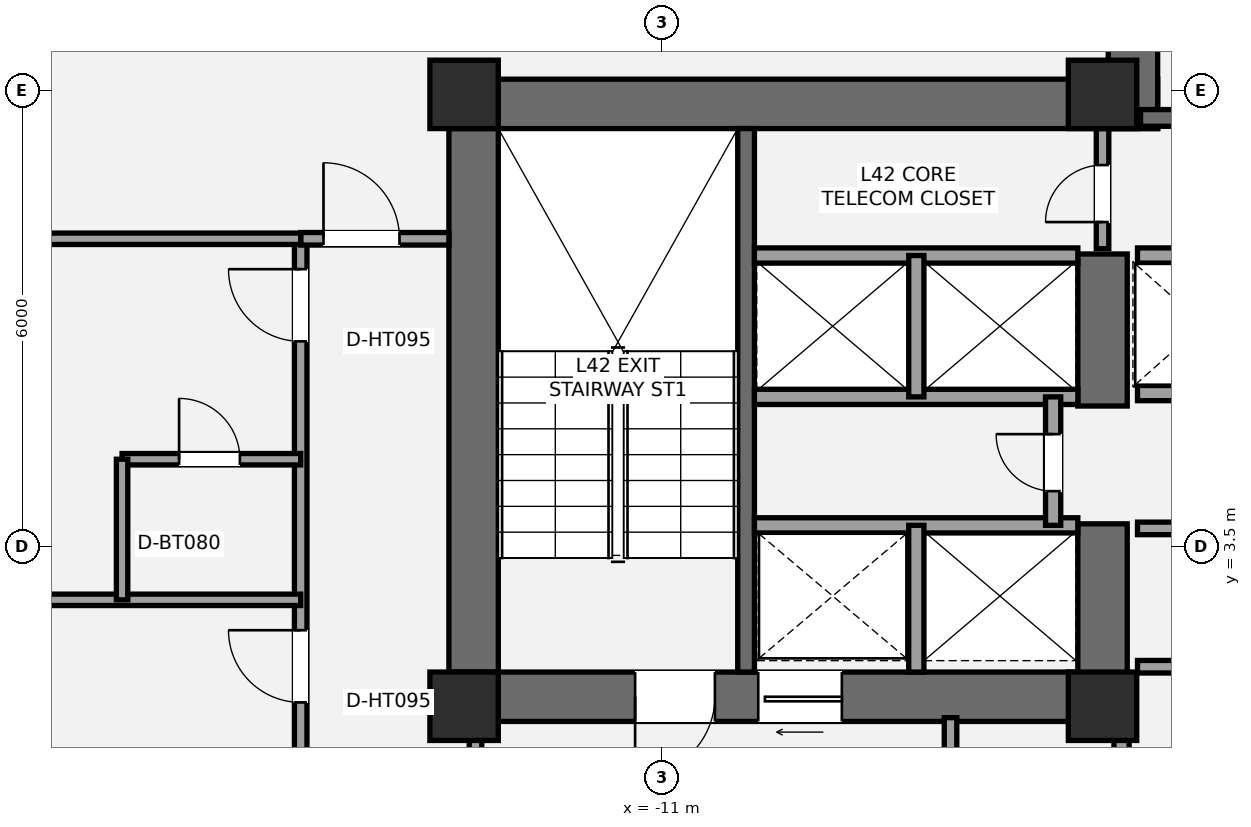
"""IFC4 building model, lengths in metres.
Left out: names, types, materials, properties, quantities, classifications, styles, units other than length and angle.
Written with IfcOpenShell. Run it as: python <this file> out.ifc"""

import sys

from ifc_helpers import new_model, si_unit, direction, frame, frame_2d, origin, origin_2d, place, context, subcontext, project, spatial, rectangle, extrude, element, fill, save


model = new_model("IFC4")
c1 = context("Model", 3, precision=1e-05, world=origin(), true_north=direction((0.0, 1.0)))
c2 = subcontext(c1, "Body", "Model", "MODEL_VIEW")
j1 = project(units=[si_unit("LENGTHUNIT", "METRE"), si_unit("PLANEANGLEUNIT", "RADIAN")], contexts=[c1])
p1 = place(None, origin())
s1 = spatial("IfcSite", under=j1, at=p1, CompositionType="ELEMENT")
p2 = place(p1, origin())
s2 = spatial("IfcBuilding", under=s1, at=p2, CompositionType="ELEMENT")
p3 = place(p2, frame((0.0, 0.0, 156.6)))
s3 = spatial("IfcBuildingStorey", under=s2, at=p3, CompositionType="ELEMENT", Elevation=156.6)
p4 = place(p3, frame((-13.475, 1.2, 0.0), z_axis=(0.0, 0.0, 1.0), x_axis=(0.0, 1.0, 0.0)))
e1 = element("IfcWall", 1, at=p4, inside=s3, PredefinedType="SHEAR", context=c2, shape_type="SweptSolid", body=[
    extrude(rectangle(XDim=8.45, YDim=0.65, at=frame_2d((4.225, 0.0))), origin(), (0.0, 0.0, 1.0), 3.2),
])
p5 = place(p3, frame((-13.8, 9.325, 0.0), z_axis=(0.0, 0.0, 1.0), x_axis=(1.0, 0.0, 0.0)))
e2 = element("IfcWall", 2, at=p5, inside=s3, PredefinedType="SHEAR", context=c2, shape_type="SweptSolid", body=[
    extrude(rectangle(XDim=9.325, YDim=0.65, at=frame_2d((4.663, 0.0))), origin(), (0.0, 0.0, 1.0), 3.2),
])
p6 = place(p3, frame((-4.875, 1.525, 0.0), z_axis=(0.0, 0.0, 1.0), x_axis=(-1.0, 0.0, 0.0)))
e3 = element("IfcWall", 3, at=p6, inside=s3, PredefinedType="SHEAR", context=c2, shape_type="SweptSolid", body=[
    extrude(rectangle(XDim=8.925, YDim=0.65, at=frame_2d((4.462, 0.0))), origin(), (0.0, 0.0, 1.0), 3.2),
])
p7 = place(p6, frame((5.425, 0.0, 0.0)))
e4 = element("IfcOpeningElement", 4, at=p7, cuts=e3, PredefinedType="OPENING", context=c2, shape_type="SweptSolid", body=[
    extrude(rectangle(XDim=1.05, YDim=2.15, at=frame_2d((0.525, 1.075))), frame((0.0, 0.335, 0.0), z_axis=(0.0, -1.0, 0.0), x_axis=(1.0, 0.0, 0.0)), (0.0, 0.0, 1.0), 0.67),
])
p8 = place(p6, frame((3.755, 0.0, 0.0)))
e5 = element("IfcOpeningElement", 5, at=p8, cuts=e3, PredefinedType="OPENING", context=c2, shape_type="SweptSolid", body=[
    extrude(rectangle(XDim=1.1, YDim=2.2, at=frame_2d((0.55, 1.1))), frame((0.0, 0.335, 0.0), z_axis=(0.0, -1.0, 0.0), x_axis=(1.0, 0.0, 0.0)), (0.0, 0.0, 1.0), 0.67),
])
p9 = place(p3, frame((-5.2, 1.2, 0.0), z_axis=(0.0, 0.0, 1.0), x_axis=(0.0, 1.0, 0.0)))
e6 = element("IfcWall", 6, at=p9, inside=s3, PredefinedType="SHEAR", context=c2, shape_type="SweptSolid", body=[
    extrude(rectangle(XDim=2.6, YDim=0.65, at=frame_2d((1.3, 0.0))), origin(), (0.0, 0.0, 1.0), 3.2),
])
p10 = place(p3, frame((-5.2, 5.35, 0.0), z_axis=(0.0, 0.0, 1.0), x_axis=(0.0, 1.0, 0.0)))
e7 = element("IfcWall", 7, at=p10, inside=s3, PredefinedType="SHEAR", context=c2, shape_type="SweptSolid", body=[
    extrude(rectangle(XDim=2.0, YDim=0.65, at=frame_2d((1.0, 0.0))), origin(), (0.0, 0.0, 1.0), 3.2),
])
p11 = place(p3, frame((-9.89, 1.85, 0.0), z_axis=(0.0, 0.0, 1.0), x_axis=(0.0, 1.0, 0.0)))
e8 = element("IfcWall", 8, at=p11, inside=s3, PredefinedType="SHEAR", context=c2, shape_type="SweptSolid", body=[
    extrude(rectangle(XDim=7.15, YDim=0.22, at=frame_2d((3.575, 0.0))), origin(), (0.0, 0.0, 1.0), 3.2),
])
p12 = place(p3, frame((-4.8, 9.0, 0.0), z_axis=(0.0, 0.0, 1.0), x_axis=(0.0, 1.0, 0.0)))
e9 = element("IfcWall", 9, at=p12, inside=s3, PredefinedType="SHEAR", context=c2, shape_type="SweptSolid", body=[
    extrude(rectangle(XDim=4.05, YDim=0.65, at=frame_2d((2.025, 0.0))), origin(), (0.0, 0.0, 1.0), 3.2),
])
p13 = place(p3, frame((-4.7, 9.14, 0.0), z_axis=(0.0, 0.0, 1.0), x_axis=(1.0, 0.0, 0.0)))
e10 = element("IfcWall", 10, at=p13, inside=s3, PredefinedType="SHEAR", context=c2, shape_type="SweptSolid", body=[
    extrude(rectangle(XDim=9.3, YDim=0.22, at=frame_2d((4.65, 0.0))), origin(), (0.0, 0.0, 1.0), 3.2),
])
p14 = place(p13, frame((1.15, 0.0, 0.0)))
e11 = element("IfcOpeningElement", 11, at=p14, cuts=e10, PredefinedType="OPENING", context=c2, shape_type="SweptSolid", body=[
    extrude(rectangle(XDim=1.05, YDim=2.15, at=frame_2d((0.525, 1.075))), frame((0.0, 0.12, 0.0), z_axis=(0.0, -1.0, 0.0), x_axis=(1.0, 0.0, 0.0)), (0.0, 0.0, 1.0), 0.24),
])
for number, where, z_axis, x_axis in (
    (12, (-13.6, 1.4, 0.0), (0.0, 0.0, 1.0), (1.0, 0.0, 0.0)),
    (13, (-13.6, 9.45, 0.0), (0.0, 0.0, 1.0), (1.0, 0.0, 0.0)),
    (14, (-5.2, 1.4, 0.0), (0.0, 0.0, 1.0), (1.0, 0.0, 0.0)),
    (15, (-5.2, 9.45, 0.0), (0.0, 0.0, 1.0), (1.0, 0.0, 0.0)),
):
    element("IfcColumn", number, at=place(p3, frame(where, z_axis=z_axis, x_axis=x_axis)), inside=s3, PredefinedType="COLUMN", context=c2, shape_type="SweptSolid", body=[
        extrude(rectangle(XDim=0.9, YDim=0.9, at=origin_2d()), origin(), (0.0, 0.0, 1.0), 3.2),
    ])
p15 = place(p3, frame((-13.45, -2.15, 0.0), z_axis=(0.0, 0.0, 1.0), x_axis=(0.0, 1.0, 0.0)))
e16 = element("IfcWall", 16, at=p15, inside=s3, PredefinedType="PARTITIONING", context=c2, shape_type="SweptSolid", body=[
    extrude(rectangle(XDim=3.4, YDim=0.165, at=frame_2d((1.7, 0.0))), origin(), (0.0, 0.0, 1.0), 2.473),
])
p16 = place(p15, frame((1.15, 0.0, 0.0)))
e17 = element("IfcOpeningElement", 17, at=p16, cuts=e16, PredefinedType="OPENING", context=c2, shape_type="SweptSolid", body=[
    extrude(rectangle(XDim=1.05, YDim=2.15, at=frame_2d((0.525, 1.075))), frame((0.0, 0.093, 0.0), z_axis=(0.0, -1.0, 0.0), x_axis=(1.0, 0.0, 0.0)), (0.0, 0.0, 1.0), 0.185),
])
p17 = place(p3, frame((-7.2, -2.15, 0.0), z_axis=(0.0, 0.0, 1.0), x_axis=(0.0, 1.0, 0.0)))
e18 = element("IfcWall", 18, at=p17, inside=s3, PredefinedType="PARTITIONING", context=c2, shape_type="SweptSolid", body=[
    extrude(rectangle(XDim=3.4, YDim=0.165, at=frame_2d((1.7, 0.0))), origin(), (0.0, 0.0, 1.0), 2.473),
])
p18 = place(p3, frame((-4.95, -2.15, 0.0), z_axis=(0.0, 0.0, 1.0), x_axis=(0.0, 1.0, 0.0)))
e19 = element("IfcWall", 19, at=p18, inside=s3, PredefinedType="SOLIDWALL", context=c2, shape_type="SweptSolid", body=[
    extrude(rectangle(XDim=3.4, YDim=0.2, at=frame_2d((1.7, 0.0))), origin(), (0.0, 0.0, 1.0), 2.473),
])
p19 = place(p18, frame((0.95, 0.0, 0.0)))
e20 = element("IfcOpeningElement", 20, at=p19, cuts=e19, PredefinedType="OPENING", context=c2, shape_type="SweptSolid", body=[
    extrude(rectangle(XDim=0.75, YDim=2.1, at=frame_2d((0.375, 1.05))), frame((0.0, 0.11, 0.0), z_axis=(0.0, -1.0, 0.0), x_axis=(1.0, 0.0, 0.0)), (0.0, 0.0, 1.0), 0.22),
])
p20 = place(p3, frame((-9.78, 3.78, 0.0), z_axis=(0.0, 0.0, 1.0), x_axis=(1.0, 0.0, 0.0)))
e21 = element("IfcWall", 21, at=p20, inside=s3, PredefinedType="SOLIDWALL", context=c2, shape_type="SweptSolid", body=[
    extrude(rectangle(XDim=4.255, YDim=0.2, at=frame_2d((2.127, 0.0))), origin(), (0.0, 0.0, 1.0), 3.02),
])
p21 = place(p3, frame((-7.65, 1.85, 0.0), z_axis=(0.0, 0.0, 1.0), x_axis=(0.0, 1.0, 0.0)))
e22 = element("IfcWall", 22, at=p21, inside=s3, PredefinedType="SOLIDWALL", context=c2, shape_type="SweptSolid", body=[
    extrude(rectangle(XDim=1.93, YDim=0.2, at=frame_2d((0.965, 0.0))), origin(), (0.0, 0.0, 1.0), 3.02),
])
for number, where, z_axis, x_axis in (
    (23, (-9.78, 5.47, 0.0), (0.0, 0.0, 1.0), (1.0, 0.0, 0.0)),
    (24, (-9.78, 7.33, 0.0), (0.0, 0.0, 1.0), (1.0, 0.0, 0.0)),
):
    element("IfcWall", number, at=place(p3, frame(where, z_axis=z_axis, x_axis=x_axis)), inside=s3, PredefinedType="SOLIDWALL", context=c2, shape_type="SweptSolid", body=[
        extrude(rectangle(XDim=4.255, YDim=0.2, at=frame_2d((2.127, 0.0))), origin(), (0.0, 0.0, 1.0), 3.02),
    ])
p22 = place(p3, frame((-7.65, 5.47, 0.0), z_axis=(0.0, 0.0, 1.0), x_axis=(0.0, 1.0, 0.0)))
e25 = element("IfcWall", 25, at=p22, inside=s3, PredefinedType="SOLIDWALL", context=c2, shape_type="SweptSolid", body=[
    extrude(rectangle(XDim=1.86, YDim=0.2, at=frame_2d((0.93, 0.0))), origin(), (0.0, 0.0, 1.0), 3.02),
])
p23 = place(p3, frame((-5.85, 3.78, 0.0), z_axis=(0.0, 0.0, 1.0), x_axis=(0.0, 1.0, 0.0)))
e26 = element("IfcWall", 26, at=p23, inside=s3, PredefinedType="SOLIDWALL", context=c2, shape_type="SweptSolid", body=[
    extrude(rectangle(XDim=1.69, YDim=0.2, at=frame_2d((0.845, 0.0))), origin(), (0.0, 0.0, 1.0), 3.02),
])
p24 = place(p23, frame((0.45, 0.0, 0.0)))
e27 = element("IfcOpeningElement", 27, at=p24, cuts=e26, PredefinedType="OPENING", context=c2, shape_type="SweptSolid", body=[
    extrude(rectangle(XDim=0.75, YDim=2.1, at=frame_2d((0.375, 1.05))), frame((0.0, 0.11, 0.0), z_axis=(0.0, -1.0, 0.0), x_axis=(1.0, 0.0, 0.0)), (0.0, 0.0, 1.0), 0.22),
])
p25 = place(p3, frame((-4.74, 1.92, 0.0), z_axis=(0.0, 0.0, 1.0), x_axis=(1.0, 0.0, 0.0)))
e28 = element("IfcWall", 28, at=p25, inside=s3, PredefinedType="PARTITIONING", context=c2, shape_type="SweptSolid", body=[
    extrude(rectangle(XDim=3.89, YDim=0.165, at=frame_2d((1.945, 0.0))), origin(), (0.0, 0.0, 1.0), 2.16),
])
p26 = place(p3, frame((-4.74, 3.74, 0.0), z_axis=(0.0, 0.0, 1.0), x_axis=(1.0, 0.0, 0.0)))
e29 = element("IfcWall", 29, at=p26, inside=s3, PredefinedType="PARTITIONING", context=c2, shape_type="SweptSolid", body=[
    extrude(rectangle(XDim=3.89, YDim=0.165, at=frame_2d((1.945, 0.0))), origin(), (0.0, 0.0, 1.0), 3.02),
])
p27 = place(p26, frame((1.6, 0.0, 0.0)))
e30 = element("IfcOpeningElement", 30, at=p27, cuts=e29, PredefinedType="OPENING", context=c2, shape_type="SweptSolid", body=[
    extrude(rectangle(XDim=0.85, YDim=2.1, at=frame_2d((0.425, 1.05))), frame((0.0, 0.093, 0.0), z_axis=(0.0, -1.0, 0.0), x_axis=(1.0, 0.0, 0.0)), (0.0, 0.0, 1.0), 0.185),
])
p28 = place(p3, frame((-4.74, 5.52, 0.0), z_axis=(0.0, 0.0, 1.0), x_axis=(1.0, 0.0, 0.0)))
e31 = element("IfcWall", 31, at=p28, inside=s3, PredefinedType="SOLIDWALL", context=c2, shape_type="SweptSolid", body=[
    extrude(rectangle(XDim=3.86, YDim=0.2, at=frame_2d((1.93, 0.0))), origin(), (0.0, 0.0, 1.0), 3.02),
])
p29 = place(p28, frame((0.55, 0.0, 0.0)))
e32 = element("IfcOpeningElement", 32, at=p29, cuts=e31, PredefinedType="OPENING", context=c2, shape_type="SweptSolid", body=[
    extrude(rectangle(XDim=1.1, YDim=2.2, at=frame_2d((0.55, 1.1))), frame((0.0, 0.11, 0.0), z_axis=(0.0, -1.0, 0.0), x_axis=(1.0, 0.0, 0.0)), (0.0, 0.0, 1.0), 0.22),
])
p30 = place(p28, frame((2.3, 0.0, 0.0)))
e33 = element("IfcOpeningElement", 33, at=p30, cuts=e31, PredefinedType="OPENING", context=c2, shape_type="SweptSolid", body=[
    extrude(rectangle(XDim=1.1, YDim=2.2, at=frame_2d((0.55, 1.1))), frame((0.0, 0.11, 0.0), z_axis=(0.0, -1.0, 0.0), x_axis=(1.0, 0.0, 0.0)), (0.0, 0.0, 1.0), 0.22),
])
p31 = place(p3, frame((-4.74, 7.33, 0.0), z_axis=(0.0, 0.0, 1.0), x_axis=(1.0, 0.0, 0.0)))
e34 = element("IfcWall", 34, at=p31, inside=s3, PredefinedType="SOLIDWALL", context=c2, shape_type="SweptSolid", body=[
    extrude(rectangle(XDim=3.86, YDim=0.2, at=frame_2d((1.93, 0.0))), origin(), (0.0, 0.0, 1.0), 3.02),
])
p32 = place(p3, frame((-5.2, 7.42, 0.0), z_axis=(0.0, 0.0, 1.0), x_axis=(0.0, 1.0, 0.0)))
e35 = element("IfcWall", 35, at=p32, inside=s3, PredefinedType="PARTITIONING", context=c2, shape_type="SweptSolid", body=[
    extrude(rectangle(XDim=1.58, YDim=0.165, at=frame_2d((0.79, 0.0))), origin(), (0.0, 0.0, 1.0), 3.02),
])
p33 = place(p32, frame((0.35, 0.0, 0.0)))
e36 = element("IfcOpeningElement", 36, at=p33, cuts=e35, PredefinedType="OPENING", context=c2, shape_type="SweptSolid", body=[
    extrude(rectangle(XDim=0.75, YDim=2.1, at=frame_2d((0.375, 1.05))), frame((0.0, 0.093, 0.0), z_axis=(0.0, -1.0, 0.0), x_axis=(1.0, 0.0, 0.0)), (0.0, 0.0, 1.0), 0.185),
])
p34 = place(p3, frame((-15.75, -13.108, 0.0), z_axis=(0.0, 0.0, 1.0), x_axis=(0.0, 1.0, 0.0)))
e37 = element("IfcWall", 37, at=p34, inside=s3, PredefinedType="PARTITIONING", context=c2, shape_type="SweptSolid", body=[
    extrude(rectangle(XDim=20.658, YDim=0.165, at=frame_2d((10.329, 0.0))), origin(), (0.0, 0.0, 1.0), 2.473),
])
p35 = place(p34, frame((5.559, 0.0, 0.0)))
e38 = element("IfcOpeningElement", 38, at=p35, cuts=e37, PredefinedType="OPENING", context=c2, shape_type="SweptSolid", body=[
    extrude(rectangle(XDim=0.85, YDim=2.1, at=frame_2d((0.425, 1.05))), frame((0.0, 0.093, 0.0), z_axis=(0.0, -1.0, 0.0), x_axis=(1.0, 0.0, 0.0)), (0.0, 0.0, 1.0), 0.185),
])
p36 = place(p34, frame((9.959, 0.0, 0.0)))
e39 = element("IfcOpeningElement", 39, at=p36, cuts=e37, PredefinedType="OPENING", context=c2, shape_type="SweptSolid", body=[
    extrude(rectangle(XDim=0.95, YDim=2.15, at=frame_2d((0.475, 1.075))), frame((0.0, 0.093, 0.0), z_axis=(0.0, -1.0, 0.0), x_axis=(1.0, 0.0, 0.0)), (0.0, 0.0, 1.0), 0.185),
])
p37 = place(p34, frame((14.559, 0.0, 0.0)))
e40 = element("IfcOpeningElement", 40, at=p37, cuts=e37, PredefinedType="OPENING", context=c2, shape_type="SweptSolid", body=[
    extrude(rectangle(XDim=0.95, YDim=2.15, at=frame_2d((0.475, 1.075))), frame((0.0, 0.093, 0.0), z_axis=(0.0, -1.0, 0.0), x_axis=(1.0, 0.0, 0.0)), (0.0, 0.0, 1.0), 0.185),
])
p38 = place(p34, frame((19.309, 0.0, 0.0)))
e41 = element("IfcOpeningElement", 41, at=p38, cuts=e37, PredefinedType="OPENING", context=c2, shape_type="SweptSolid", body=[
    extrude(rectangle(XDim=0.95, YDim=2.15, at=frame_2d((0.475, 1.075))), frame((0.0, 0.093, 0.0), z_axis=(0.0, -1.0, 0.0), x_axis=(1.0, 0.0, 0.0)), (0.0, 0.0, 1.0), 0.185),
])
p39 = place(p3, frame((-15.75, 7.55, 0.0), z_axis=(0.0, 0.0, 1.0), x_axis=(1.0, 0.0, 0.0)))
e42 = element("IfcWall", 42, at=p39, inside=s3, PredefinedType="PARTITIONING", context=c2, shape_type="SweptSolid", body=[
    extrude(rectangle(XDim=1.95, YDim=0.165, at=frame_2d((0.975, 0.0))), origin(), (0.0, 0.0, 1.0), 3.02),
])
p40 = place(p39, frame((0.3, 0.0, 0.0)))
e43 = element("IfcOpeningElement", 43, at=p40, cuts=e42, PredefinedType="OPENING", context=c2, shape_type="SweptSolid", body=[
    extrude(rectangle(XDim=1.0, YDim=2.15, at=frame_2d((0.5, 1.075))), frame((0.0, 0.093, 0.0), z_axis=(0.0, -1.0, 0.0), x_axis=(1.0, 0.0, 0.0)), (0.0, 0.0, 1.0), 0.185),
])
p41 = place(p3, frame((-22.134, 7.55, 0.0), z_axis=(0.0, 0.0, 1.0), x_axis=(1.0, 0.0, 0.0)))
e44 = element("IfcWall", 44, at=p41, inside=s3, PredefinedType="PLUMBINGWALL", context=c2, shape_type="SweptSolid", body=[
    extrude(rectangle(XDim=6.384, YDim=0.15, at=frame_2d((3.192, 0.0))), origin(), (0.0, 0.0, 1.0), 2.473),
])
p42 = place(p3, frame((-24.004, 2.8, 0.0), z_axis=(0.0, 0.0, 1.0), x_axis=(1.0, 0.0, 0.0)))
e45 = element("IfcWall", 45, at=p42, inside=s3, PredefinedType="PLUMBINGWALL", context=c2, shape_type="SweptSolid", body=[
    extrude(rectangle(XDim=8.254, YDim=0.15, at=frame_2d((4.127, 0.0))), origin(), (0.0, 0.0, 1.0), 2.473),
])
p43 = place(p3, frame((-18.1, 4.65, 0.0), z_axis=(0.0, 0.0, 1.0), x_axis=(1.0, 0.0, 0.0)))
e46 = element("IfcWall", 46, at=p43, inside=s3, PredefinedType="PLUMBINGWALL", context=c2, shape_type="SweptSolid", body=[
    extrude(rectangle(XDim=2.35, YDim=0.15, at=frame_2d((1.175, 0.0))), origin(), (0.0, 0.0, 1.0), 2.473),
])
p44 = place(p43, frame((0.75, 0.0, 0.0)))
e47 = element("IfcOpeningElement", 47, at=p44, cuts=e46, PredefinedType="OPENING", context=c2, shape_type="SweptSolid", body=[
    extrude(rectangle(XDim=0.8, YDim=2.1, at=frame_2d((0.4, 1.05))), frame((0.0, 0.085, 0.0), z_axis=(0.0, -1.0, 0.0), x_axis=(1.0, 0.0, 0.0)), (0.0, 0.0, 1.0), 0.17),
])
p45 = place(p3, frame((-18.1, 2.8, 0.0), z_axis=(0.0, 0.0, 1.0), x_axis=(0.0, 1.0, 0.0)))
e48 = element("IfcWall", 48, at=p45, inside=s3, PredefinedType="PLUMBINGWALL", context=c2, shape_type="SweptSolid", body=[
    extrude(rectangle(XDim=1.85, YDim=0.15, at=frame_2d((0.925, 0.0))), origin(), (0.0, 0.0, 1.0), 3.02),
])
p46 = place(p7, origin())
e49 = element("IfcDoor", 49, at=p46, inside=s3, OperationType="SINGLE_SWING_RIGHT", PredefinedType="DOOR", context=c2, shape_type="SweptSolid", body=[
    extrude(rectangle(XDim=1.05, YDim=2.15, at=frame_2d((0.525, 1.075))), frame((0.0, 0.025, 0.0), z_axis=(0.0, -1.0, 0.0), x_axis=(1.0, 0.0, 0.0)), (0.0, 0.0, 1.0), 0.05),
])
fill(e4, e49)
p47 = place(p8, origin())
e50 = element("IfcDoor", 50, at=p47, inside=s3, OperationType="SLIDING_TO_LEFT", PredefinedType="DOOR", context=c2, shape_type="SweptSolid", body=[
    extrude(rectangle(XDim=1.1, YDim=2.2, at=frame_2d((0.55, 1.1))), frame((0.0, 0.025, 0.0), z_axis=(0.0, -1.0, 0.0), x_axis=(1.0, 0.0, 0.0)), (0.0, 0.0, 1.0), 0.05),
])
fill(e5, e50)
p48 = place(p24, origin())
e51 = element("IfcDoor", 51, at=p48, inside=s3, OperationType="SINGLE_SWING_RIGHT", PredefinedType="DOOR", context=c2, shape_type="SweptSolid", body=[
    extrude(rectangle(XDim=0.75, YDim=2.1, at=frame_2d((0.375, 1.05))), frame((0.0, 0.025, 0.0), z_axis=(0.0, -1.0, 0.0), x_axis=(1.0, 0.0, 0.0)), (0.0, 0.0, 1.0), 0.05),
])
fill(e27, e51)
p49 = place(p33, origin())
e52 = element("IfcDoor", 52, at=p49, inside=s3, OperationType="SINGLE_SWING_LEFT", PredefinedType="DOOR", context=c2, shape_type="SweptSolid", body=[
    extrude(rectangle(XDim=0.75, YDim=2.1, at=frame_2d((0.375, 1.05))), frame((0.0, 0.025, 0.0), z_axis=(0.0, -1.0, 0.0), x_axis=(1.0, 0.0, 0.0)), (0.0, 0.0, 1.0), 0.05),
])
fill(e36, e52)
p50 = place(p40, origin())
e53 = element("IfcDoor", 53, at=p50, inside=s3, OperationType="SINGLE_SWING_LEFT", PredefinedType="DOOR", context=c2, shape_type="SweptSolid", body=[
    extrude(rectangle(XDim=1.0, YDim=2.15, at=frame_2d((0.5, 1.075))), frame((0.0, 0.025, 0.0), z_axis=(0.0, -1.0, 0.0), x_axis=(1.0, 0.0, 0.0)), (0.0, 0.0, 1.0), 0.05),
])
fill(e43, e53)
p51 = place(p37, origin())
e54 = element("IfcDoor", 54, at=p51, inside=s3, OperationType="SINGLE_SWING_RIGHT", PredefinedType="DOOR", context=c2, shape_type="SweptSolid", body=[
    extrude(rectangle(XDim=0.95, YDim=2.15, at=frame_2d((0.475, 1.075))), frame((0.0, 0.025, 0.0), z_axis=(0.0, -1.0, 0.0), x_axis=(1.0, 0.0, 0.0)), (0.0, 0.0, 1.0), 0.05),
])
fill(e40, e54)
p52 = place(p38, origin())
e55 = element("IfcDoor", 55, at=p52, inside=s3, OperationType="SINGLE_SWING_RIGHT", PredefinedType="DOOR", context=c2, shape_type="SweptSolid", body=[
    extrude(rectangle(XDim=0.95, YDim=2.15, at=frame_2d((0.475, 1.075))), frame((0.0, 0.025, 0.0), z_axis=(0.0, -1.0, 0.0), x_axis=(1.0, 0.0, 0.0)), (0.0, 0.0, 1.0), 0.05),
])
fill(e41, e55)
p53 = place(p44, origin())
e56 = element("IfcDoor", 56, at=p53, inside=s3, OperationType="SINGLE_SWING_LEFT", PredefinedType="DOOR", context=c2, shape_type="SweptSolid", body=[
    extrude(rectangle(XDim=0.8, YDim=2.1, at=frame_2d((0.4, 1.05))), frame((0.0, 0.025, 0.0), z_axis=(0.0, -1.0, 0.0), x_axis=(1.0, 0.0, 0.0)), (0.0, 0.0, 1.0), 0.05),
])
fill(e47, e56)
save(model, sys.argv[1])
